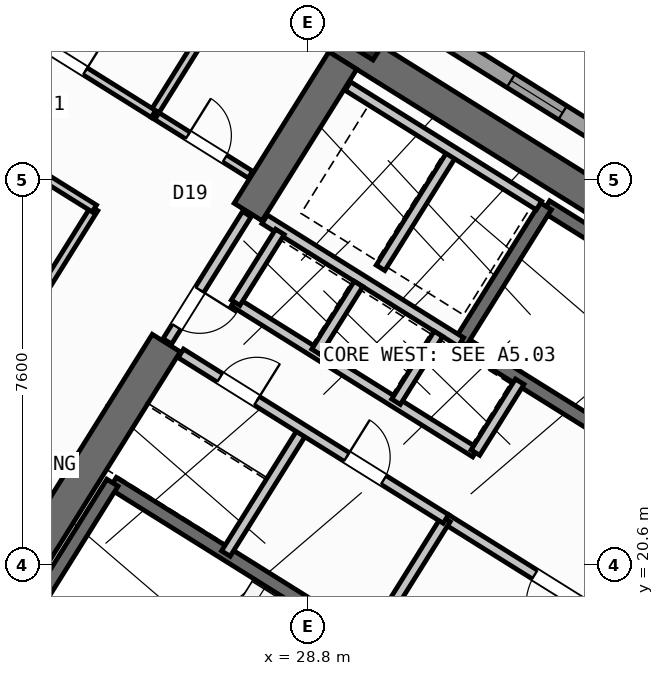
"""IFC4 building model, lengths in metres.
Left out: names, types, materials, properties, quantities, classifications, styles, units other than length and angle.
Written with IfcOpenShell. Run it as: python <this file> out.ifc"""

import sys

from ifc_helpers import new_model, si_unit, direction, frame, frame_2d, origin, origin_2d, place, context, subcontext, project, spatial, rectangle, hollow_rectangle, extrude, source, transform, mapped, element, fill, save


model = new_model("IFC4")
c1 = context("Model", 3, precision=1e-05, world=origin(), true_north=direction((0.0, 1.0)))
c2 = subcontext(c1, "Body", "Model", "MODEL_VIEW")
j1 = project(units=[si_unit("LENGTHUNIT", "METRE"), si_unit("PLANEANGLEUNIT", "RADIAN")], contexts=[c1])
p1 = place(None, origin())
s1 = spatial("IfcSite", under=j1, at=p1, CompositionType="ELEMENT")
p2 = place(p1, origin())
s2 = spatial("IfcBuilding", under=s1, at=p2, CompositionType="ELEMENT")
p3 = place(p2, frame((0.0, 0.0, 31.2)))
s3 = spatial("IfcBuildingStorey", under=s2, at=p3, CompositionType="ELEMENT", Elevation=31.2)
p4 = place(p3, frame((40.615, 23.983, 0.0), z_axis=(0.0, 0.0, 1.0), x_axis=(-0.848045953968, 0.529922692436, 0.0)))
e1 = element("IfcWall", 1, at=p4, inside=s3, PredefinedType="SHEAR", context=c2, shape_type="SweptSolid", body=[
    extrude(rectangle(XDim=13.24, YDim=0.65, at=frame_2d((6.62, 0.0))), origin(), (0.0, 0.0, 1.0), 3.35),
])
p5 = place(p3, frame((29.491, 30.552, 0.0), z_axis=(0.0, 0.0, 1.0), x_axis=(-0.529893103397, -0.8480644427, 0.0)))
e2 = element("IfcWall", 2, at=p5, inside=s3, PredefinedType="SHEAR", context=c2, shape_type="SweptSolid", body=[
    extrude(rectangle(XDim=3.525, YDim=0.65, at=frame_2d((1.763, 0.0))), origin(), (0.0, 0.0, 1.0), 3.35),
])
p6 = place(p3, frame((26.007, 24.976, 0.0), z_axis=(0.0, 0.0, 1.0), x_axis=(-0.529916319127, -0.848049936456, 0.0)))
e3 = element("IfcWall", 3, at=p6, inside=s3, PredefinedType="SHEAR", context=c2, shape_type="SweptSolid", body=[
    extrude(rectangle(XDim=6.375, YDim=0.65, at=frame_2d((3.188, 0.0))), origin(), (0.0, 0.0, 1.0), 3.35),
])
m1 = source(origin(), c2, "Body", "SweptSolid", [
    extrude(hollow_rectangle(XDim=1.0, YDim=1.0, WallThickness=0.04, at=origin_2d()), origin(), (0.0, 0.0, 1.0), 3.6),
])
p7 = place(p3, frame((29.928, 31.251, 0.0), z_axis=(0.0, 0.0, 1.0), x_axis=(-0.848048096156, 0.529919264233, 0.0)))
e4 = element("IfcColumn", 4, at=p7, inside=s3, PredefinedType="COLUMN", context=c2, shape_type="MappedRepresentation", body=[
    mapped(m1, transform((0.0, 0.0, 0.0), scale=1.0)),
])
p8 = place(p3, frame((29.268, 6.429, 0.0), z_axis=(0.0, 0.0, 1.0), x_axis=(-0.848049971435, 0.529916263149, 0.0)))
e5 = element("IfcWall", 5, at=p8, inside=s3, PredefinedType="STANDARD", context=c2, shape_type="SweptSolid", body=[
    extrude(rectangle(XDim=31.588, YDim=0.32, at=frame_2d((15.794, 0.0))), origin(), (0.0, 0.0, 1.0), 3.35),
])
p9 = place(p8, frame((16.362, 0.0, 0.0)))
e6 = element("IfcOpeningElement", 6, at=p9, cuts=e5, PredefinedType="OPENING", context=c2, shape_type="SweptSolid", body=[
    extrude(rectangle(XDim=1.2, YDim=2.15, at=frame_2d((0.6, 1.075))), frame((0.0, 0.17, 0.0), z_axis=(0.0, -1.0, 0.0), x_axis=(1.0, 0.0, 0.0)), (0.0, 0.0, 1.0), 0.34),
])
p10 = place(p8, frame((2.989, 0.0, 0.8)))
e7 = element("IfcOpeningElement", 7, at=p10, cuts=e5, PredefinedType="OPENING", context=c2, shape_type="SweptSolid", body=[
    extrude(rectangle(XDim=2.1, YDim=1.55, at=frame_2d((1.05, 0.775))), frame((0.0, 0.17, 0.0), z_axis=(0.0, -1.0, 0.0), x_axis=(1.0, 0.0, 0.0)), (0.0, 0.0, 1.0), 0.34),
])
p11 = place(p8, frame((8.359, 0.0, 0.8)))
e8 = element("IfcOpeningElement", 8, at=p11, cuts=e5, PredefinedType="OPENING", context=c2, shape_type="SweptSolid", body=[
    extrude(rectangle(XDim=2.1, YDim=1.55, at=frame_2d((1.05, 0.775))), frame((0.0, 0.17, 0.0), z_axis=(0.0, -1.0, 0.0), x_axis=(1.0, 0.0, 0.0)), (0.0, 0.0, 1.0), 0.34),
])
p12 = place(p8, frame((13.284, 0.0, 0.95)))
e9 = element("IfcOpeningElement", 9, at=p12, cuts=e5, PredefinedType="OPENING", context=c2, shape_type="SweptSolid", body=[
    extrude(rectangle(XDim=1.2, YDim=1.4, at=frame_2d((0.6, 0.7))), frame((0.0, 0.17, 0.0), z_axis=(0.0, -1.0, 0.0), x_axis=(1.0, 0.0, 0.0)), (0.0, 0.0, 1.0), 0.34),
])
p13 = place(p8, frame((29.188, 0.0, 0.95)))
e10 = element("IfcOpeningElement", 10, at=p13, cuts=e5, PredefinedType="OPENING", context=c2, shape_type="SweptSolid", body=[
    extrude(rectangle(XDim=1.2, YDim=1.4, at=frame_2d((0.6, 0.7))), frame((0.0, 0.17, 0.0), z_axis=(0.0, -1.0, 0.0), x_axis=(1.0, 0.0, 0.0)), (0.0, 0.0, 1.0), 0.34),
])
p14 = place(p8, frame((19.11, 0.0, 1.0)))
e11 = element("IfcOpeningElement", 11, at=p14, cuts=e5, PredefinedType="OPENING", context=c2, shape_type="SweptSolid", body=[
    extrude(rectangle(XDim=0.9, YDim=1.25, at=frame_2d((0.45, 0.625))), frame((0.0, 0.17, 0.0), z_axis=(0.0, -1.0, 0.0), x_axis=(1.0, 0.0, 0.0)), (0.0, 0.0, 1.0), 0.34),
])
p15 = place(p8, frame((21.226, 0.0, 1.0)))
e12 = element("IfcOpeningElement", 12, at=p15, cuts=e5, PredefinedType="OPENING", context=c2, shape_type="SweptSolid", body=[
    extrude(rectangle(XDim=0.9, YDim=1.25, at=frame_2d((0.45, 0.625))), frame((0.0, 0.17, 0.0), z_axis=(0.0, -1.0, 0.0), x_axis=(1.0, 0.0, 0.0)), (0.0, 0.0, 1.0), 0.34),
])
p16 = place(p8, frame((23.014, 0.0, 1.0)))
e13 = element("IfcOpeningElement", 13, at=p16, cuts=e5, PredefinedType="OPENING", context=c2, shape_type="SweptSolid", body=[
    extrude(rectangle(XDim=0.9, YDim=1.25, at=frame_2d((0.45, 0.625))), frame((0.0, 0.17, 0.0), z_axis=(0.0, -1.0, 0.0), x_axis=(1.0, 0.0, 0.0)), (0.0, 0.0, 1.0), 0.34),
])
p17 = place(p8, frame((24.802, 0.0, 1.0)))
e14 = element("IfcOpeningElement", 14, at=p17, cuts=e5, PredefinedType="OPENING", context=c2, shape_type="SweptSolid", body=[
    extrude(rectangle(XDim=0.9, YDim=1.25, at=frame_2d((0.45, 0.625))), frame((0.0, 0.17, 0.0), z_axis=(0.0, -1.0, 0.0), x_axis=(1.0, 0.0, 0.0)), (0.0, 0.0, 1.0), 0.34),
])
p18 = place(p8, frame((26.59, 0.0, 1.0)))
e15 = element("IfcOpeningElement", 15, at=p18, cuts=e5, PredefinedType="OPENING", context=c2, shape_type="SweptSolid", body=[
    extrude(rectangle(XDim=0.9, YDim=1.25, at=frame_2d((0.45, 0.625))), frame((0.0, 0.17, 0.0), z_axis=(0.0, -1.0, 0.0), x_axis=(1.0, 0.0, 0.0)), (0.0, 0.0, 1.0), 0.34),
])
p19 = place(p3, frame((14.138, 41.825, 0.0), z_axis=(0.0, 0.0, 1.0), x_axis=(0.848046498049, -0.529921821731, 0.0)))
e16 = element("IfcWall", 16, at=p19, inside=s3, PredefinedType="STANDARD", context=c2, shape_type="SweptSolid", body=[
    extrude(rectangle(XDim=31.588, YDim=0.32, at=frame_2d((15.794, 0.0))), origin(), (0.0, 0.0, 1.0), 3.35),
])
p20 = place(p19, frame((3.369, 0.0, 0.0)))
e17 = element("IfcOpeningElement", 17, at=p20, cuts=e16, PredefinedType="OPENING", context=c2, shape_type="SweptSolid", body=[
    extrude(rectangle(XDim=1.05, YDim=2.15, at=frame_2d((0.525, 1.075))), frame((0.0, 0.17, 0.0), z_axis=(0.0, -1.0, 0.0), x_axis=(1.0, 0.0, 0.0)), (0.0, 0.0, 1.0), 0.34),
])
p21 = place(p19, frame((0.946, 0.0, 0.85)))
e18 = element("IfcOpeningElement", 18, at=p21, cuts=e16, PredefinedType="OPENING", context=c2, shape_type="SweptSolid", body=[
    extrude(rectangle(XDim=1.8, YDim=1.5, at=frame_2d((0.9, 0.75))), frame((0.0, 0.17, 0.0), z_axis=(0.0, -1.0, 0.0), x_axis=(1.0, 0.0, 0.0)), (0.0, 0.0, 1.0), 0.34),
])
p22 = place(p19, frame((8.46, 0.0, 0.85)))
e19 = element("IfcOpeningElement", 19, at=p22, cuts=e16, PredefinedType="OPENING", context=c2, shape_type="SweptSolid", body=[
    extrude(rectangle(XDim=1.8, YDim=1.5, at=frame_2d((0.9, 0.75))), frame((0.0, 0.17, 0.0), z_axis=(0.0, -1.0, 0.0), x_axis=(1.0, 0.0, 0.0)), (0.0, 0.0, 1.0), 0.34),
])
p23 = place(p19, frame((13.899, 0.0, 0.85)))
e20 = element("IfcOpeningElement", 20, at=p23, cuts=e16, PredefinedType="OPENING", context=c2, shape_type="SweptSolid", body=[
    extrude(rectangle(XDim=1.5, YDim=1.5, at=frame_2d((0.75, 0.75))), frame((0.0, 0.17, 0.0), z_axis=(0.0, -1.0, 0.0), x_axis=(1.0, 0.0, 0.0)), (0.0, 0.0, 1.0), 0.34),
])
p24 = place(p19, frame((22.019, 0.0, 0.95)))
e21 = element("IfcOpeningElement", 21, at=p24, cuts=e16, PredefinedType="OPENING", context=c2, shape_type="SweptSolid", body=[
    extrude(rectangle(XDim=1.2, YDim=1.4, at=frame_2d((0.6, 0.7))), frame((0.0, 0.17, 0.0), z_axis=(0.0, -1.0, 0.0), x_axis=(1.0, 0.0, 0.0)), (0.0, 0.0, 1.0), 0.34),
])
p25 = place(p19, frame((27.569, 0.0, 0.95)))
e22 = element("IfcOpeningElement", 22, at=p25, cuts=e16, PredefinedType="OPENING", context=c2, shape_type="SweptSolid", body=[
    extrude(rectangle(XDim=1.2, YDim=1.4, at=frame_2d((0.6, 0.7))), frame((0.0, 0.17, 0.0), z_axis=(0.0, -1.0, 0.0), x_axis=(1.0, 0.0, 0.0)), (0.0, 0.0, 1.0), 0.34),
])
p26 = place(p3, frame((31.28, 18.261, 0.0), z_axis=(0.0, 0.0, 1.0), x_axis=(-0.848051618787, 0.529913626805, 0.0)))
e23 = element("IfcWall", 23, at=p26, inside=s3, PredefinedType="SHEAR", context=c2, shape_type="SweptSolid", body=[
    extrude(rectangle(XDim=7.46, YDim=0.26, at=frame_2d((3.73, 0.0))), origin(), (0.0, 0.0, 1.0), 3.35),
])
p27 = place(p26, frame((0.36, 0.0, 0.0)))
e24 = element("IfcOpeningElement", 24, at=p27, cuts=e23, PredefinedType="OPENING", context=c2, shape_type="SweptSolid", body=[
    extrude(rectangle(XDim=0.86, YDim=2.05, at=frame_2d((0.43, 1.025))), frame((0.0, 0.14, 0.0), z_axis=(0.0, -1.0, 0.0), x_axis=(1.0, 0.0, 0.0)), (0.0, 0.0, 1.0), 0.28),
])
p28 = place(p3, frame((24.945, 22.22, 0.0), z_axis=(0.0, 0.0, 1.0), x_axis=(-0.529908658664, -0.84805472316, 0.0)))
e25 = element("IfcWall", 25, at=p28, inside=s3, PredefinedType="SHEAR", context=c2, shape_type="SweptSolid", body=[
    extrude(rectangle(XDim=3.16, YDim=0.26, at=frame_2d((1.58, 0.0))), origin(), (0.0, 0.0, 1.0), 3.35),
])
p29 = place(p3, frame((39.721, 23.788, 0.0), z_axis=(0.0, 0.0, 1.0), x_axis=(-0.848054434086, 0.529909121291, 0.0)))
e26 = element("IfcWall", 26, at=p29, inside=s3, PredefinedType="SHEAR", context=c2, shape_type="SweptSolid", body=[
    extrude(rectangle(XDim=7.33, YDim=0.26, at=frame_2d((3.665, 0.0))), origin(), (0.0, 0.0, 1.0), 3.35),
])
p30 = place(p3, frame((38.046, 21.108, 0.0), z_axis=(0.0, 0.0, 1.0), x_axis=(-0.848054434086, 0.529909121291, 0.0)))
e27 = element("IfcWall", 27, at=p30, inside=s3, PredefinedType="SHEAR", context=c2, shape_type="SweptSolid", body=[
    extrude(rectangle(XDim=7.33, YDim=0.26, at=frame_2d((3.665, 0.0))), origin(), (0.0, 0.0, 1.0), 3.35),
])
p31 = place(p30, frame((0.22, 0.0, 0.0)))
e28 = element("IfcOpeningElement", 28, at=p31, cuts=e27, PredefinedType="OPENING", context=c2, shape_type="SweptSolid", body=[
    extrude(rectangle(XDim=1.1, YDim=2.1, at=frame_2d((0.55, 1.05))), frame((0.0, 0.14, 0.0), z_axis=(0.0, -1.0, 0.0), x_axis=(1.0, 0.0, 0.0)), (0.0, 0.0, 1.0), 0.28),
])
p32 = place(p3, frame((33.496, 27.677, 0.0), z_axis=(0.0, 0.0, 1.0), x_axis=(-0.529908658664, -0.84805472316, 0.0)))
e29 = element("IfcWall", 29, at=p32, inside=s3, PredefinedType="SHEAR", context=c2, shape_type="SweptSolid", body=[
    extrude(rectangle(XDim=3.16, YDim=0.26, at=frame_2d((1.58, 0.0))), origin(), (0.0, 0.0, 1.0), 3.35),
])
p33 = place(p3, frame((36.374, 18.474, 0.0), z_axis=(0.0, 0.0, 1.0), x_axis=(-0.848051071577, 0.529914502535, 0.0)))
e30 = element("IfcWall", 30, at=p33, inside=s3, PredefinedType="STANDARD", context=c2, shape_type="SweptSolid", body=[
    extrude(rectangle(XDim=5.718, YDim=0.2, at=frame_2d((2.859, 0.0))), origin(), (0.0, 0.0, 1.0), 3.34),
])
p34 = place(p33, frame((2.498, 0.0, 0.0)))
e31 = element("IfcOpeningElement", 31, at=p34, cuts=e30, PredefinedType="OPENING", context=c2, shape_type="SweptSolid", body=[
    extrude(rectangle(XDim=1.15, YDim=2.1, at=frame_2d((0.575, 1.05))), frame((0.0, 0.11, 0.0), z_axis=(0.0, -1.0, 0.0), x_axis=(1.0, 0.0, 0.0)), (0.0, 0.0, 1.0), 0.22),
])
p35 = place(p3, frame((31.822, 24.998, 0.0), z_axis=(0.0, 0.0, 1.0), x_axis=(-0.848058348634, 0.529902856485, 0.0)))
e32 = element("IfcWall", 32, at=p35, inside=s3, PredefinedType="STANDARD", context=c2, shape_type="SweptSolid", body=[
    extrude(rectangle(XDim=4.568, YDim=0.2, at=frame_2d((2.284, 0.0))), origin(), (0.0, 0.0, 1.0), 3.34),
])
p36 = place(p3, frame((32.108, 22.814, 0.0), z_axis=(0.0, 0.0, 1.0), x_axis=(-0.848042229521, 0.529928652696, 0.0)))
e33 = element("IfcWall", 33, at=p36, inside=s3, PredefinedType="STANDARD", context=c2, shape_type="SweptSolid", body=[
    extrude(rectangle(XDim=5.62, YDim=0.2, at=frame_2d((2.81, 0.0))), origin(), (0.0, 0.0, 1.0), 3.34),
])
p37 = place(p3, frame((32.982, 24.213, 0.0), z_axis=(0.0, 0.0, 1.0), x_axis=(-0.529839334948, -0.84809803628, 0.0)))
e34 = element("IfcWall", 34, at=p37, inside=s3, PredefinedType="STANDARD", context=c2, shape_type="SweptSolid", body=[
    extrude(rectangle(XDim=1.65, YDim=0.2, at=frame_2d((0.825, 0.0))), origin(), (0.0, 0.0, 1.0), 3.34),
])
p38 = place(p3, frame((28.25, 27.17, 0.0), z_axis=(0.0, 0.0, 1.0), x_axis=(-0.529905827651, -0.848056492117, 0.0)))
e35 = element("IfcWall", 35, at=p38, inside=s3, PredefinedType="STANDARD", context=c2, shape_type="SweptSolid", body=[
    extrude(rectangle(XDim=1.65, YDim=0.2, at=frame_2d((0.825, 0.0))), origin(), (0.0, 0.0, 1.0), 3.34),
])
p39 = place(p3, frame((31.645, 28.716, 0.0), z_axis=(0.0, 0.0, 1.0), x_axis=(-0.52986693015, -0.848080795876, 0.0)))
e36 = element("IfcWall", 36, at=p39, inside=s3, PredefinedType="STANDARD", context=c2, shape_type="SweptSolid", body=[
    extrude(rectangle(XDim=2.66, YDim=0.2, at=frame_2d((1.33, 0.0))), origin(), (0.0, 0.0, 1.0), 3.34),
])
p40 = place(p3, frame((33.363, 27.69, 0.0), z_axis=(0.0, 0.0, 1.0), x_axis=(-0.848053806312, 0.529910125964, 0.0)))
e37 = element("IfcWall", 37, at=p40, inside=s3, PredefinedType="STANDARD", context=c2, shape_type="SweptSolid", body=[
    extrude(rectangle(XDim=4.448, YDim=0.2, at=frame_2d((2.224, 0.0))), origin(), (0.0, 0.0, 1.0), 3.34),
])
for number, where, z_axis, x_axis in (
    (38, (31.379, 25.156, 0.0), (0.0, 0.0, 1.0), (-0.53, -0.848, 0.0)),
    (39, (29.801, 26.142, 0.0), (0.0, 0.0, 1.0), (-0.53, -0.848, 0.0)),
):
    element("IfcWall", number, at=place(p3, frame(where, z_axis=z_axis, x_axis=x_axis)), inside=s3, PredefinedType="STANDARD", context=c2, shape_type="SweptSolid", body=[
        extrude(rectangle(XDim=1.58, YDim=0.2, at=frame_2d((0.79, 0.0))), origin(), (0.0, 0.0, 1.0), 3.34),
    ])
for number, where, z_axis, x_axis in (
    (40, (31.525, 21.504, 0.0), (0.0, 0.0, 1.0), (-0.53, -0.848, 0.0)),
    (41, (28.71, 23.263, 0.0), (0.0, 0.0, 1.0), (-0.53, -0.848, 0.0)),
):
    element("IfcWall", number, at=place(p3, frame(where, z_axis=z_axis, x_axis=x_axis)), inside=s3, PredefinedType="STANDARD", context=c2, shape_type="SweptSolid", body=[
        extrude(rectangle(XDim=2.88, YDim=0.2, at=frame_2d((1.44, 0.0))), origin(), (0.0, 0.0, 1.0), 3.34),
    ])
p41 = place(p3, frame((31.525, 21.504, 0.0), z_axis=(0.0, 0.0, 1.0), x_axis=(-0.848044998614, 0.529924221305, 0.0)))
e42 = element("IfcWall", 42, at=p41, inside=s3, PredefinedType="STANDARD", context=c2, shape_type="SweptSolid", body=[
    extrude(rectangle(XDim=6.168, YDim=0.2, at=frame_2d((3.084, 0.0))), origin(), (0.0, 0.0, 1.0), 3.34),
])
p42 = place(p41, frame((4.4, 0.0, 0.0)))
e43 = element("IfcOpeningElement", 43, at=p42, cuts=e42, PredefinedType="OPENING", context=c2, shape_type="SweptSolid", body=[
    extrude(rectangle(XDim=0.86, YDim=2.05, at=frame_2d((0.43, 1.025))), frame((0.0, 0.11, 0.0), z_axis=(0.0, -1.0, 0.0), x_axis=(1.0, 0.0, 0.0)), (0.0, 0.0, 1.0), 0.22),
])
p43 = place(p41, frame((1.45, 0.0, 0.0)))
e44 = element("IfcOpeningElement", 44, at=p43, cuts=e42, PredefinedType="OPENING", context=c2, shape_type="SweptSolid", body=[
    extrude(rectangle(XDim=0.86, YDim=2.05, at=frame_2d((0.43, 1.025))), frame((0.0, 0.11, 0.0), z_axis=(0.0, -1.0, 0.0), x_axis=(1.0, 0.0, 0.0)), (0.0, 0.0, 1.0), 0.22),
])
p44 = place(p3, frame((27.596, 27.52, 0.0), z_axis=(0.0, 0.0, 1.0), x_axis=(-0.529865479138, -0.848081702443, 0.0)))
e45 = element("IfcWall", 45, at=p44, inside=s3, PredefinedType="STANDARD", context=c2, shape_type="SweptSolid", body=[
    extrude(rectangle(XDim=2.96, YDim=0.2, at=frame_2d((1.48, 0.0))), origin(), (0.0, 0.0, 1.0), 3.34),
])
p45 = place(p44, frame((1.76, 0.0, 0.0)))
e46 = element("IfcOpeningElement", 46, at=p45, cuts=e45, PredefinedType="OPENING", context=c2, shape_type="SweptSolid", body=[
    extrude(rectangle(XDim=0.86, YDim=2.05, at=frame_2d((0.43, 1.025))), frame((0.0, 0.11, 0.0), z_axis=(0.0, -1.0, 0.0), x_axis=(1.0, 0.0, 0.0)), (0.0, 0.0, 1.0), 0.22),
])
p46 = place(p3, frame((27.669, 28.3, 0.0), z_axis=(0.0, 0.0, 1.0), x_axis=(-0.848040823168, 0.52993090327, 0.0)))
e47 = element("IfcWall", 47, at=p46, inside=s3, PredefinedType="PARTITIONING", context=c2, shape_type="SweptSolid", body=[
    extrude(rectangle(XDim=2.258, YDim=0.16, at=frame_2d((1.129, 0.0))), origin(), (0.0, 0.0, 1.0), 3.34),
])
p47 = place(p46, frame((0.598, 0.0, 0.0)))
e48 = element("IfcOpeningElement", 48, at=p47, cuts=e47, PredefinedType="OPENING", context=c2, shape_type="SweptSolid", body=[
    extrude(rectangle(XDim=0.86, YDim=2.05, at=frame_2d((0.43, 1.025))), frame((0.0, 0.09, 0.0), z_axis=(0.0, -1.0, 0.0), x_axis=(1.0, 0.0, 0.0)), (0.0, 0.0, 1.0), 0.18),
])
p48 = place(p3, frame((27.953, 33.016, 0.0), z_axis=(0.0, 0.0, 1.0), x_axis=(-0.529872022255, -0.848077614391, 0.0)))
e49 = element("IfcWall", 49, at=p48, inside=s3, PredefinedType="PARTITIONING", context=c2, shape_type="SweptSolid", body=[
    extrude(rectangle(XDim=4.15, YDim=0.16, at=frame_2d((2.075, 0.0))), origin(), (0.0, 0.0, 1.0), 3.34),
])
p49 = place(p3, frame((24.588, 27.631, 0.0), z_axis=(0.0, 0.0, 1.0), x_axis=(-0.529914586043, -0.848051019396, 0.0)))
e50 = element("IfcWall", 50, at=p49, inside=s3, PredefinedType="PARTITIONING", context=c2, shape_type="SweptSolid", body=[
    extrude(rectangle(XDim=15.35, YDim=0.16, at=frame_2d((7.675, 0.0))), origin(), (0.0, 0.0, 1.0), 3.34),
])
p50 = place(p3, frame((25.754, 29.497, 0.0), z_axis=(0.0, 0.0, 1.0), x_axis=(-0.848045850158, 0.529922858565, 0.0)))
e51 = element("IfcWall", 51, at=p50, inside=s3, PredefinedType="PARTITIONING", context=c2, shape_type="SweptSolid", body=[
    extrude(rectangle(XDim=16.73, YDim=0.16, at=frame_2d((8.365, 0.0))), origin(), (0.0, 0.0, 1.0), 3.34),
])
p51 = place(p50, frame((1.588, 0.0, 0.0)))
e52 = element("IfcOpeningElement", 52, at=p51, cuts=e51, PredefinedType="OPENING", context=c2, shape_type="SweptSolid", body=[
    extrude(rectangle(XDim=1.0, YDim=2.1, at=frame_2d((0.5, 1.05))), frame((0.0, 0.09, 0.0), z_axis=(0.0, -1.0, 0.0), x_axis=(1.0, 0.0, 0.0)), (0.0, 0.0, 1.0), 0.18),
])
p52 = place(p50, frame((6.685, 0.0, 0.0)))
e53 = element("IfcOpeningElement", 53, at=p52, cuts=e51, PredefinedType="OPENING", context=c2, shape_type="SweptSolid", body=[
    extrude(rectangle(XDim=1.0, YDim=2.1, at=frame_2d((0.5, 1.05))), frame((0.0, 0.09, 0.0), z_axis=(0.0, -1.0, 0.0), x_axis=(1.0, 0.0, 0.0)), (0.0, 0.0, 1.0), 0.18),
])
p53 = place(p50, frame((12.951, 0.0, 0.0)))
e54 = element("IfcOpeningElement", 54, at=p53, cuts=e51, PredefinedType="OPENING", context=c2, shape_type="SweptSolid", body=[
    extrude(rectangle(XDim=1.0, YDim=2.1, at=frame_2d((0.5, 1.05))), frame((0.0, 0.09, 0.0), z_axis=(0.0, -1.0, 0.0), x_axis=(1.0, 0.0, 0.0)), (0.0, 0.0, 1.0), 0.18),
])
p54 = place(p3, frame((24.588, 27.631, 0.0), z_axis=(0.0, 0.0, 1.0), x_axis=(-0.848041752158, 0.529929416617, 0.0)))
e55 = element("IfcWall", 55, at=p54, inside=s3, PredefinedType="PARTITIONING", context=c2, shape_type="SweptSolid", body=[
    extrude(rectangle(XDim=16.73, YDim=0.16, at=frame_2d((8.365, 0.0))), origin(), (0.0, 0.0, 1.0), 3.34),
])
p55 = place(p54, frame((2.22, 0.0, 0.0)))
e56 = element("IfcOpeningElement", 56, at=p55, cuts=e55, PredefinedType="OPENING", context=c2, shape_type="SweptSolid", body=[
    extrude(rectangle(XDim=0.86, YDim=2.05, at=frame_2d((0.43, 1.025))), frame((0.0, 0.09, 0.0), z_axis=(0.0, -1.0, 0.0), x_axis=(1.0, 0.0, 0.0)), (0.0, 0.0, 1.0), 0.18),
])
p56 = place(p54, frame((14.22, 0.0, 0.0)))
e57 = element("IfcOpeningElement", 57, at=p56, cuts=e55, PredefinedType="OPENING", context=c2, shape_type="SweptSolid", body=[
    extrude(rectangle(XDim=1.0, YDim=2.1, at=frame_2d((0.5, 1.05))), frame((0.0, 0.09, 0.0), z_axis=(0.0, -1.0, 0.0), x_axis=(1.0, 0.0, 0.0)), (0.0, 0.0, 1.0), 0.18),
])
m2 = source(origin(), c2, "Body", "SweptSolid", [
    extrude(rectangle(XDim=1.2, YDim=1.4, at=frame_2d((0.6, 0.7))), frame((0.0, 0.03, 0.0), z_axis=(0.0, -1.0, 0.0), x_axis=(1.0, 0.0, 0.0)), (0.0, 0.0, 1.0), 0.06),
])
p57 = place(p24, origin())
e58 = element("IfcWindow", 58, at=p57, inside=s3, PartitioningType="SINGLE_PANEL", PredefinedType="WINDOW", context=c2, shape_type="MappedRepresentation", body=[
    mapped(m2, transform((0.0, 0.0, 0.0), scale=1.0)),
])
fill(e21, e58)
m3 = source(origin(), c2, "Body", "SweptSolid", [
    extrude(rectangle(XDim=1.15, YDim=2.1, at=frame_2d((0.575, 1.05))), frame((0.0, 0.025, 0.0), z_axis=(0.0, -1.0, 0.0), x_axis=(1.0, 0.0, 0.0)), (0.0, 0.0, 1.0), 0.05),
])
p58 = place(p34, origin())
e59 = element("IfcDoor", 59, at=p58, inside=s3, OperationType="SINGLE_SWING_LEFT", PredefinedType="DOOR", context=c2, shape_type="MappedRepresentation", body=[
    mapped(m3, transform((0.0, 0.0, 0.0), scale=1.0)),
])
fill(e31, e59)
m4 = source(origin(), c2, "Body", "SweptSolid", [
    extrude(rectangle(XDim=0.86, YDim=2.05, at=frame_2d((0.43, 1.025))), frame((0.0, 0.025, 0.0), z_axis=(0.0, -1.0, 0.0), x_axis=(1.0, 0.0, 0.0)), (0.0, 0.0, 1.0), 0.05),
])
p59 = place(p42, frame((0.86, 0.0, 0.0), z_axis=(0.0, 0.0, 1.0), x_axis=(-1.0, 0.0, 0.0)))
e60 = element("IfcDoor", 60, at=p59, inside=s3, OperationType="SINGLE_SWING_RIGHT", PredefinedType="DOOR", context=c2, shape_type="MappedRepresentation", body=[
    mapped(m4, transform((0.0, 0.0, 0.0), scale=1.0)),
])
fill(e43, e60)
p60 = place(p43, frame((0.86, 0.0, 0.0), z_axis=(0.0, 0.0, 1.0), x_axis=(-1.0, 0.0, 0.0)))
e61 = element("IfcDoor", 61, at=p60, inside=s3, OperationType="SINGLE_SWING_LEFT", PredefinedType="DOOR", context=c2, shape_type="MappedRepresentation", body=[
    mapped(m4, transform((0.0, 0.0, 0.0), scale=1.0)),
])
fill(e44, e61)
p61 = place(p47, frame((0.86, 0.0, 0.0), z_axis=(0.0, 0.0, 1.0), x_axis=(-1.0, 0.0, 0.0)))
e62 = element("IfcDoor", 62, at=p61, inside=s3, OperationType="SINGLE_SWING_LEFT", PredefinedType="DOOR", context=c2, shape_type="MappedRepresentation", body=[
    mapped(m4, transform((0.0, 0.0, 0.0), scale=1.0)),
])
fill(e48, e62)
p62 = place(p45, origin())
e63 = element("IfcDoor", 63, at=p62, inside=s3, OperationType="SINGLE_SWING_LEFT", PredefinedType="DOOR", context=c2, shape_type="MappedRepresentation", body=[
    mapped(m4, transform((0.0, 0.0, 0.0), scale=1.0)),
])
fill(e46, e63)
m5 = source(origin(), c2, "Body", "SweptSolid", [
    extrude(rectangle(XDim=1.0, YDim=2.1, at=frame_2d((0.5, 1.05))), frame((0.0, 0.025, 0.0), z_axis=(0.0, -1.0, 0.0), x_axis=(1.0, 0.0, 0.0)), (0.0, 0.0, 1.0), 0.05),
])
p63 = place(p51, frame((1.0, 0.0, 0.0), z_axis=(0.0, 0.0, 1.0), x_axis=(-1.0, 0.0, 0.0)))
e64 = element("IfcDoor", 64, at=p63, inside=s3, OperationType="SINGLE_SWING_RIGHT", PredefinedType="DOOR", context=c2, shape_type="MappedRepresentation", body=[
    mapped(m5, transform((0.0, 0.0, 0.0), scale=1.0)),
])
fill(e52, e64)
save(model, sys.argv[1])
